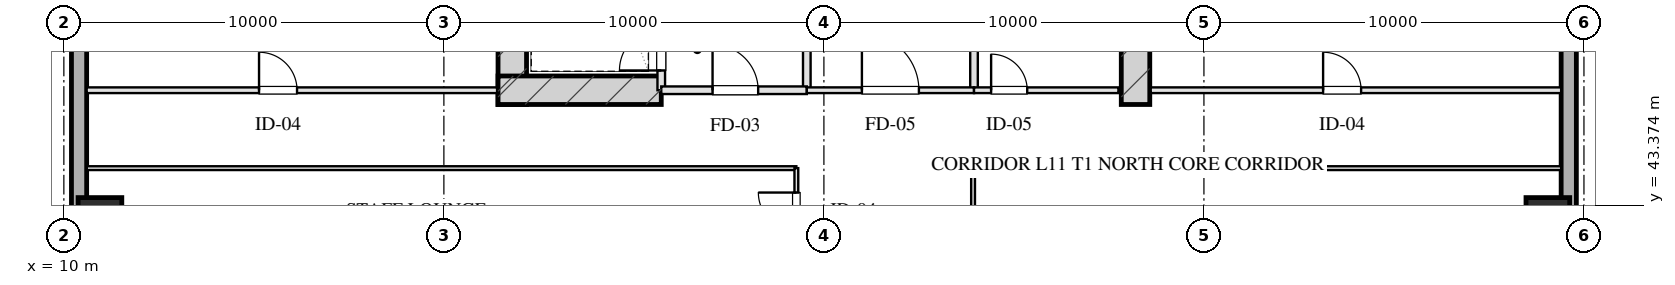
"""IFC4 building model, lengths in metres.
Left out: names, types, materials, properties, quantities, classifications, styles, units other than length and angle.
Written with IfcOpenShell. Run it as: python <this file> out.ifc"""

import sys

from ifc_helpers import new_model, si_unit, direction, frame, frame_2d, origin, origin_2d, place, context, subcontext, project, spatial, rectangle, hollow_rectangle, extrude, element, fill, save


model = new_model("IFC4")
c1 = context("Model", 3, precision=1e-05, world=origin(), true_north=direction((0.0, 1.0)))
c2 = subcontext(c1, "Body", "Model", "MODEL_VIEW")
j1 = project(units=[si_unit("LENGTHUNIT", "METRE"), si_unit("PLANEANGLEUNIT", "RADIAN")], contexts=[c1])
p1 = place(None, origin())
s1 = spatial("IfcSite", under=j1, at=p1, CompositionType="ELEMENT")
p2 = place(p1, origin())
s2 = spatial("IfcBuilding", under=s1, at=p2, CompositionType="ELEMENT")
p3 = place(p2, frame((0.0, 0.0, 50.6)))
s3 = spatial("IfcBuildingStorey", under=s2, at=p3, CompositionType="ELEMENT", Elevation=50.6)
for number, where, z_axis, x_axis in (
    (1, (21.8, 46.025, 0.0), (0.0, 0.0, 1.0), (0.0, 1.0, 0.0)),
    (2, (38.2, 46.025, 0.0), (0.0, 0.0, 1.0), (0.0, 1.0, 0.0)),
):
    element("IfcWall", number, at=place(p3, frame(where, z_axis=z_axis, x_axis=x_axis)), inside=s3, PredefinedType="SHEAR", context=c2, shape_type="SweptSolid", body=[
        extrude(rectangle(XDim=9.63, YDim=0.75, at=frame_2d((4.815, 0.0))), origin(), (0.0, 0.0, 1.0), 3.45),
    ])
p4 = place(p3, frame((21.425, 46.4, 0.0), z_axis=(0.0, 0.0, 1.0), x_axis=(1.0, 0.0, 0.0)))
e3 = element("IfcWall", 3, at=p4, inside=s3, PredefinedType="SHEAR", context=c2, shape_type="SweptSolid", body=[
    extrude(rectangle(XDim=4.295, YDim=0.75, at=frame_2d((2.147, 0.0))), origin(), (0.0, 0.0, 1.0), 3.45),
])
for number, where, z_axis, x_axis in (
    (4, (10.95, 43.0, 0.0), (0.0, 0.0, 1.0), (1.0, 0.0, 0.0)),
    (5, (49.05, 43.0, 0.0), (0.0, 0.0, 1.0), (1.0, 0.0, 0.0)),
):
    element("IfcColumn", number, at=place(p3, frame(where, z_axis=z_axis, x_axis=x_axis)), inside=s3, PredefinedType="COLUMN", context=c2, shape_type="SweptSolid", body=[
        extrude(hollow_rectangle(XDim=1.15, YDim=1.15, WallThickness=0.04, at=origin_2d()), origin(), (0.0, 0.0, 1.0), 3.451),
    ])
p5 = place(p3, frame((10.4, 7.2, 0.0), z_axis=(0.0, 0.0, 1.0), x_axis=(0.0, 1.0, 0.0)))
e6 = element("IfcWall", 6, at=p5, inside=s3, PredefinedType="SOLIDWALL", context=c2, shape_type="SweptSolid", body=[
    extrude(rectangle(XDim=53.6, YDim=0.4, at=frame_2d((26.8, 0.0))), origin(), (0.0, 0.0, 1.0), 2.61),
])
p6 = place(p5, frame((29.35, 0.0, 0.0)))
e7 = element("IfcOpeningElement", 7, at=p6, cuts=e6, PredefinedType="OPENING", context=c2, shape_type="SweptSolid", body=[
    extrude(rectangle(XDim=1.1, YDim=2.15, at=frame_2d((0.55, 1.075))), frame((0.0, 0.21, 0.0), z_axis=(0.0, -1.0, 0.0), x_axis=(1.0, 0.0, 0.0)), (0.0, 0.0, 1.0), 0.42),
])
p7 = place(p3, frame((49.6, 60.8, 0.0), z_axis=(0.0, 0.0, 1.0), x_axis=(0.0, -1.0, 0.0)))
e8 = element("IfcWall", 8, at=p7, inside=s3, PredefinedType="SOLIDWALL", context=c2, shape_type="SweptSolid", body=[
    extrude(rectangle(XDim=53.6, YDim=0.4, at=frame_2d((26.8, 0.0))), origin(), (0.0, 0.0, 1.0), 2.61),
])
p8 = place(p7, frame((31.95, 0.0, 0.75)))
e9 = element("IfcOpeningElement", 9, at=p8, cuts=e8, PredefinedType="OPENING", context=c2, shape_type="SweptSolid", body=[
    extrude(rectangle(XDim=2.5, YDim=1.46, at=frame_2d((1.25, 0.73))), frame((0.0, 0.21, 0.0), z_axis=(0.0, -1.0, 0.0), x_axis=(1.0, 0.0, 0.0)), (0.0, 0.0, 1.0), 0.42),
])
p9 = place(p7, frame((20.45, 0.0, 0.0)))
e10 = element("IfcOpeningElement", 10, at=p9, cuts=e8, PredefinedType="OPENING", context=c2, shape_type="SweptSolid", body=[
    extrude(rectangle(XDim=1.1, YDim=2.15, at=frame_2d((0.55, 1.075))), frame((0.0, 0.21, 0.0), z_axis=(0.0, -1.0, 0.0), x_axis=(1.0, 0.0, 0.0)), (0.0, 0.0, 1.0), 0.42),
])
p10 = place(p3, frame((25.72, 46.4, 0.0), z_axis=(0.0, 0.0, 1.0), x_axis=(0.0, 1.0, 0.0)))
e11 = element("IfcWall", 11, at=p10, inside=s3, PredefinedType="PARTITIONING", context=c2, shape_type="SweptSolid", body=[
    extrude(rectangle(XDim=1.9, YDim=0.2, at=frame_2d((0.95, 0.0))), origin(), (0.0, 0.0, 1.0), 3.175),
])
p11 = place(p10, frame((0.52, 0.0, 0.0)))
e12 = element("IfcOpeningElement", 12, at=p11, cuts=e11, PredefinedType="OPENING", context=c2, shape_type="SweptSolid", body=[
    extrude(rectangle(XDim=1.1, YDim=2.05, at=frame_2d((0.55, 1.025))), frame((0.0, 0.11, 0.0), z_axis=(0.0, -1.0, 0.0), x_axis=(1.0, 0.0, 0.0)), (0.0, 0.0, 1.0), 0.22),
])
p12 = place(p3, frame((29.55, 46.4, 0.0), z_axis=(0.0, 0.0, 1.0), x_axis=(0.0, 1.0, 0.0)))
e13 = element("IfcWall", 13, at=p12, inside=s3, PredefinedType="PARTITIONING", context=c2, shape_type="SweptSolid", body=[
    extrude(rectangle(XDim=8.43, YDim=0.2, at=frame_2d((4.215, 0.0))), origin(), (0.0, 0.0, 1.0), 3.175),
])
p13 = place(p3, frame((25.72, 46.4, 0.0), z_axis=(0.0, 0.0, 1.0), x_axis=(1.0, 0.0, 0.0)))
e14 = element("IfcWall", 14, at=p13, inside=s3, PredefinedType="PARTITIONING", context=c2, shape_type="SweptSolid", body=[
    extrude(rectangle(XDim=3.83, YDim=0.2, at=frame_2d((1.915, 0.0))), origin(), (0.0, 0.0, 1.0), 3.175),
])
p14 = place(p13, frame((1.35, 0.0, 0.0)))
e15 = element("IfcOpeningElement", 15, at=p14, cuts=e14, PredefinedType="OPENING", context=c2, shape_type="SweptSolid", body=[
    extrude(rectangle(XDim=1.2, YDim=2.05, at=frame_2d((0.6, 1.025))), frame((0.0, 0.11, 0.0), z_axis=(0.0, -1.0, 0.0), x_axis=(1.0, 0.0, 0.0)), (0.0, 0.0, 1.0), 0.22),
])
p15 = place(p3, frame((33.95, 46.4, 0.0), z_axis=(0.0, 0.0, 1.0), x_axis=(0.0, 1.0, 0.0)))
e16 = element("IfcWall", 16, at=p15, inside=s3, PredefinedType="PARTITIONING", context=c2, shape_type="SweptSolid", body=[
    extrude(rectangle(XDim=8.43, YDim=0.2, at=frame_2d((4.215, 0.0))), origin(), (0.0, 0.0, 1.0), 3.175),
])
p16 = place(p3, frame((29.55, 46.4, 0.0), z_axis=(0.0, 0.0, 1.0), x_axis=(1.0, 0.0, 0.0)))
e17 = element("IfcWall", 17, at=p16, inside=s3, PredefinedType="PARTITIONING", context=c2, shape_type="SweptSolid", body=[
    extrude(rectangle(XDim=4.4, YDim=0.15, at=frame_2d((2.2, 0.0))), origin(), (0.0, 0.0, 1.0), 3.175),
])
p17 = place(p16, frame((1.45, 0.0, 0.0)))
e18 = element("IfcOpeningElement", 18, at=p17, cuts=e17, PredefinedType="OPENING", context=c2, shape_type="SweptSolid", body=[
    extrude(rectangle(XDim=1.5, YDim=2.05, at=frame_2d((0.75, 1.025))), frame((0.0, 0.085, 0.0), z_axis=(0.0, -1.0, 0.0), x_axis=(1.0, 0.0, 0.0)), (0.0, 0.0, 1.0), 0.17),
])
p18 = place(p3, frame((33.95, 46.4, 0.0), z_axis=(0.0, 0.0, 1.0), x_axis=(1.0, 0.0, 0.0)))
e19 = element("IfcWall", 19, at=p18, inside=s3, PredefinedType="PARTITIONING", context=c2, shape_type="SweptSolid", body=[
    extrude(rectangle(XDim=3.8, YDim=0.15, at=frame_2d((1.9, 0.0))), origin(), (0.0, 0.0, 1.0), 3.175),
])
p19 = place(p18, frame((0.45, 0.0, 0.0)))
e20 = element("IfcOpeningElement", 20, at=p19, cuts=e19, PredefinedType="OPENING", context=c2, shape_type="SweptSolid", body=[
    extrude(rectangle(XDim=0.95, YDim=2.05, at=frame_2d((0.475, 1.025))), frame((0.0, 0.085, 0.0), z_axis=(0.0, -1.0, 0.0), x_axis=(1.0, 0.0, 0.0)), (0.0, 0.0, 1.0), 0.17),
])
p20 = place(p3, frame((10.6, 46.4, 0.0), z_axis=(0.0, 0.0, 1.0), x_axis=(1.0, 0.0, 0.0)))
e21 = element("IfcWall", 21, at=p20, inside=s3, PredefinedType="PARTITIONING", context=c2, shape_type="SweptSolid", body=[
    extrude(rectangle(XDim=10.8, YDim=0.15, at=frame_2d((5.4, 0.0))), origin(), (0.0, 0.0, 1.0), 3.175),
])
p21 = place(p20, frame((4.536, 0.0, 0.0)))
e22 = element("IfcOpeningElement", 22, at=p21, cuts=e21, PredefinedType="OPENING", context=c2, shape_type="SweptSolid", body=[
    extrude(rectangle(XDim=1.0, YDim=2.05, at=frame_2d((0.5, 1.025))), frame((0.0, 0.085, 0.0), z_axis=(0.0, -1.0, 0.0), x_axis=(1.0, 0.0, 0.0)), (0.0, 0.0, 1.0), 0.17),
])
p22 = place(p3, frame((38.6, 46.4, 0.0), z_axis=(0.0, 0.0, 1.0), x_axis=(1.0, 0.0, 0.0)))
e23 = element("IfcWall", 23, at=p22, inside=s3, PredefinedType="PARTITIONING", context=c2, shape_type="SweptSolid", body=[
    extrude(rectangle(XDim=10.8, YDim=0.15, at=frame_2d((5.4, 0.0))), origin(), (0.0, 0.0, 1.0), 3.175),
])
p23 = place(p22, frame((4.536, 0.0, 0.0)))
e24 = element("IfcOpeningElement", 24, at=p23, cuts=e23, PredefinedType="OPENING", context=c2, shape_type="SweptSolid", body=[
    extrude(rectangle(XDim=1.0, YDim=2.05, at=frame_2d((0.5, 1.025))), frame((0.0, 0.085, 0.0), z_axis=(0.0, -1.0, 0.0), x_axis=(1.0, 0.0, 0.0)), (0.0, 0.0, 1.0), 0.17),
])
p24 = place(p3, frame((10.6, 44.35, 0.0), z_axis=(0.0, 0.0, 1.0), x_axis=(1.0, 0.0, 0.0)))
e25 = element("IfcWall", 25, at=p24, inside=s3, PredefinedType="MOVABLE", context=c2, shape_type="SweptSolid", body=[
    extrude(rectangle(XDim=18.675, YDim=0.1, at=frame_2d((9.337, 0.0))), origin(), (0.0, 0.0, 1.0), 3.175),
])
p25 = place(p3, frame((33.925, 44.35, 0.0), z_axis=(0.0, 0.0, 1.0), x_axis=(1.0, 0.0, 0.0)))
e26 = element("IfcWall", 26, at=p25, inside=s3, PredefinedType="MOVABLE", context=c2, shape_type="SweptSolid", body=[
    extrude(rectangle(XDim=15.475, YDim=0.1, at=frame_2d((7.737, 0.0))), origin(), (0.0, 0.0, 1.0), 3.175),
])
p26 = place(p3, frame((29.275, 23.65, 0.0), z_axis=(0.0, 0.0, 1.0), x_axis=(0.0, 1.0, 0.0)))
e27 = element("IfcWall", 27, at=p26, inside=s3, PredefinedType="MOVABLE", context=c2, shape_type="SweptSolid", body=[
    extrude(rectangle(XDim=20.7, YDim=0.1, at=frame_2d((10.35, 0.0))), origin(), (0.0, 0.0, 1.0), 3.175),
])
p27 = place(p26, frame((0.775, 0.0, 0.0)))
e28 = element("IfcOpeningElement", 28, at=p27, cuts=e27, PredefinedType="OPENING", context=c2, shape_type="SweptSolid", body=[
    extrude(rectangle(XDim=1.0, YDim=2.05, at=frame_2d((0.5, 1.025))), frame((0.0, 0.06, 0.0), z_axis=(0.0, -1.0, 0.0), x_axis=(1.0, 0.0, 0.0)), (0.0, 0.0, 1.0), 0.12),
])
p28 = place(p26, frame((3.95, 0.0, 0.0)))
e29 = element("IfcOpeningElement", 29, at=p28, cuts=e27, PredefinedType="OPENING", context=c2, shape_type="SweptSolid", body=[
    extrude(rectangle(XDim=1.0, YDim=2.05, at=frame_2d((0.5, 1.025))), frame((0.0, 0.06, 0.0), z_axis=(0.0, -1.0, 0.0), x_axis=(1.0, 0.0, 0.0)), (0.0, 0.0, 1.0), 0.12),
])
p29 = place(p26, frame((8.364, 0.0, 0.0)))
e30 = element("IfcOpeningElement", 30, at=p29, cuts=e27, PredefinedType="OPENING", context=c2, shape_type="SweptSolid", body=[
    extrude(rectangle(XDim=1.0, YDim=2.05, at=frame_2d((0.5, 1.025))), frame((0.0, 0.06, 0.0), z_axis=(0.0, -1.0, 0.0), x_axis=(1.0, 0.0, 0.0)), (0.0, 0.0, 1.0), 0.12),
])
p30 = place(p26, frame((12.864, 0.0, 0.0)))
e31 = element("IfcOpeningElement", 31, at=p30, cuts=e27, PredefinedType="OPENING", context=c2, shape_type="SweptSolid", body=[
    extrude(rectangle(XDim=1.0, YDim=2.05, at=frame_2d((0.5, 1.025))), frame((0.0, 0.06, 0.0), z_axis=(0.0, -1.0, 0.0), x_axis=(1.0, 0.0, 0.0)), (0.0, 0.0, 1.0), 0.12),
])
p31 = place(p26, frame((16.383, 0.0, 0.0)))
e32 = element("IfcOpeningElement", 32, at=p31, cuts=e27, PredefinedType="OPENING", context=c2, shape_type="SweptSolid", body=[
    extrude(rectangle(XDim=1.05, YDim=2.05, at=frame_2d((0.525, 1.025))), frame((0.0, 0.06, 0.0), z_axis=(0.0, -1.0, 0.0), x_axis=(1.0, 0.0, 0.0)), (0.0, 0.0, 1.0), 0.12),
])
p32 = place(p26, frame((19.058, 0.0, 0.0)))
e33 = element("IfcOpeningElement", 33, at=p32, cuts=e27, PredefinedType="OPENING", context=c2, shape_type="SweptSolid", body=[
    extrude(rectangle(XDim=1.0, YDim=2.05, at=frame_2d((0.5, 1.025))), frame((0.0, 0.06, 0.0), z_axis=(0.0, -1.0, 0.0), x_axis=(1.0, 0.0, 0.0)), (0.0, 0.0, 1.0), 0.12),
])
p33 = place(p3, frame((33.925, 23.65, 0.0), z_axis=(0.0, 0.0, 1.0), x_axis=(0.0, 1.0, 0.0)))
e34 = element("IfcWall", 34, at=p33, inside=s3, PredefinedType="MOVABLE", context=c2, shape_type="SweptSolid", body=[
    extrude(rectangle(XDim=20.7, YDim=0.1, at=frame_2d((10.35, 0.0))), origin(), (0.0, 0.0, 1.0), 3.175),
])
p34 = place(p33, frame((2.675, 0.0, 0.0)))
e35 = element("IfcOpeningElement", 35, at=p34, cuts=e34, PredefinedType="OPENING", context=c2, shape_type="SweptSolid", body=[
    extrude(rectangle(XDim=1.0, YDim=2.05, at=frame_2d((0.5, 1.025))), frame((0.0, 0.06, 0.0), z_axis=(0.0, -1.0, 0.0), x_axis=(1.0, 0.0, 0.0)), (0.0, 0.0, 1.0), 0.12),
])
p35 = place(p33, frame((9.85, 0.0, 0.0)))
e36 = element("IfcOpeningElement", 36, at=p35, cuts=e34, PredefinedType="OPENING", context=c2, shape_type="SweptSolid", body=[
    extrude(rectangle(XDim=0.85, YDim=2.05, at=frame_2d((0.425, 1.025))), frame((0.0, 0.06, 0.0), z_axis=(0.0, -1.0, 0.0), x_axis=(1.0, 0.0, 0.0)), (0.0, 0.0, 1.0), 0.12),
])
p36 = place(p33, frame((17.025, 0.0, 0.0)))
e37 = element("IfcOpeningElement", 37, at=p36, cuts=e34, PredefinedType="OPENING", context=c2, shape_type="SweptSolid", body=[
    extrude(rectangle(XDim=1.0, YDim=2.05, at=frame_2d((0.5, 1.025))), frame((0.0, 0.06, 0.0), z_axis=(0.0, -1.0, 0.0), x_axis=(1.0, 0.0, 0.0)), (0.0, 0.0, 1.0), 0.12),
])
p37 = place(p11, origin())
e38 = element("IfcDoor", 38, at=p37, inside=s3, OperationType="SINGLE_SWING_LEFT", PredefinedType="DOOR", context=c2, shape_type="SweptSolid", body=[
    extrude(rectangle(XDim=1.1, YDim=2.05, at=frame_2d((0.55, 1.025))), frame((0.0, 0.025, 0.0), z_axis=(0.0, -1.0, 0.0), x_axis=(1.0, 0.0, 0.0)), (0.0, 0.0, 1.0), 0.05),
])
fill(e12, e38)
p38 = place(p14, origin())
e39 = element("IfcDoor", 39, at=p38, inside=s3, OperationType="SINGLE_SWING_LEFT", PredefinedType="DOOR", context=c2, shape_type="SweptSolid", body=[
    extrude(rectangle(XDim=1.2, YDim=2.05, at=frame_2d((0.6, 1.025))), frame((0.0, 0.025, 0.0), z_axis=(0.0, -1.0, 0.0), x_axis=(1.0, 0.0, 0.0)), (0.0, 0.0, 1.0), 0.05),
])
fill(e15, e39)
p39 = place(p17, origin())
e40 = element("IfcDoor", 40, at=p39, inside=s3, OperationType="SINGLE_SWING_LEFT", PredefinedType="DOOR", context=c2, shape_type="SweptSolid", body=[
    extrude(rectangle(XDim=1.5, YDim=2.05, at=frame_2d((0.75, 1.025))), frame((0.0, 0.025, 0.0), z_axis=(0.0, -1.0, 0.0), x_axis=(1.0, 0.0, 0.0)), (0.0, 0.0, 1.0), 0.05),
])
fill(e18, e40)
p40 = place(p19, origin())
e41 = element("IfcDoor", 41, at=p40, inside=s3, OperationType="SINGLE_SWING_LEFT", PredefinedType="DOOR", context=c2, shape_type="SweptSolid", body=[
    extrude(rectangle(XDim=0.95, YDim=2.05, at=frame_2d((0.475, 1.025))), frame((0.0, 0.025, 0.0), z_axis=(0.0, -1.0, 0.0), x_axis=(1.0, 0.0, 0.0)), (0.0, 0.0, 1.0), 0.05),
])
fill(e20, e41)
p41 = place(p21, origin())
e42 = element("IfcDoor", 42, at=p41, inside=s3, OperationType="SINGLE_SWING_LEFT", PredefinedType="DOOR", context=c2, shape_type="SweptSolid", body=[
    extrude(rectangle(XDim=1.0, YDim=2.05, at=frame_2d((0.5, 1.025))), frame((0.0, 0.025, 0.0), z_axis=(0.0, -1.0, 0.0), x_axis=(1.0, 0.0, 0.0)), (0.0, 0.0, 1.0), 0.05),
])
fill(e22, e42)
p42 = place(p23, origin())
e43 = element("IfcDoor", 43, at=p42, inside=s3, OperationType="SINGLE_SWING_LEFT", PredefinedType="DOOR", context=c2, shape_type="SweptSolid", body=[
    extrude(rectangle(XDim=1.0, YDim=2.05, at=frame_2d((0.5, 1.025))), frame((0.0, 0.025, 0.0), z_axis=(0.0, -1.0, 0.0), x_axis=(1.0, 0.0, 0.0)), (0.0, 0.0, 1.0), 0.05),
])
fill(e24, e43)
p43 = place(p32, origin())
e44 = element("IfcDoor", 44, at=p43, inside=s3, OperationType="SINGLE_SWING_RIGHT", PredefinedType="DOOR", context=c2, shape_type="SweptSolid", body=[
    extrude(rectangle(XDim=1.0, YDim=2.05, at=frame_2d((0.5, 1.025))), frame((0.0, 0.025, 0.0), z_axis=(0.0, -1.0, 0.0), x_axis=(1.0, 0.0, 0.0)), (0.0, 0.0, 1.0), 0.05),
])
fill(e33, e44)
save(model, sys.argv[1])
